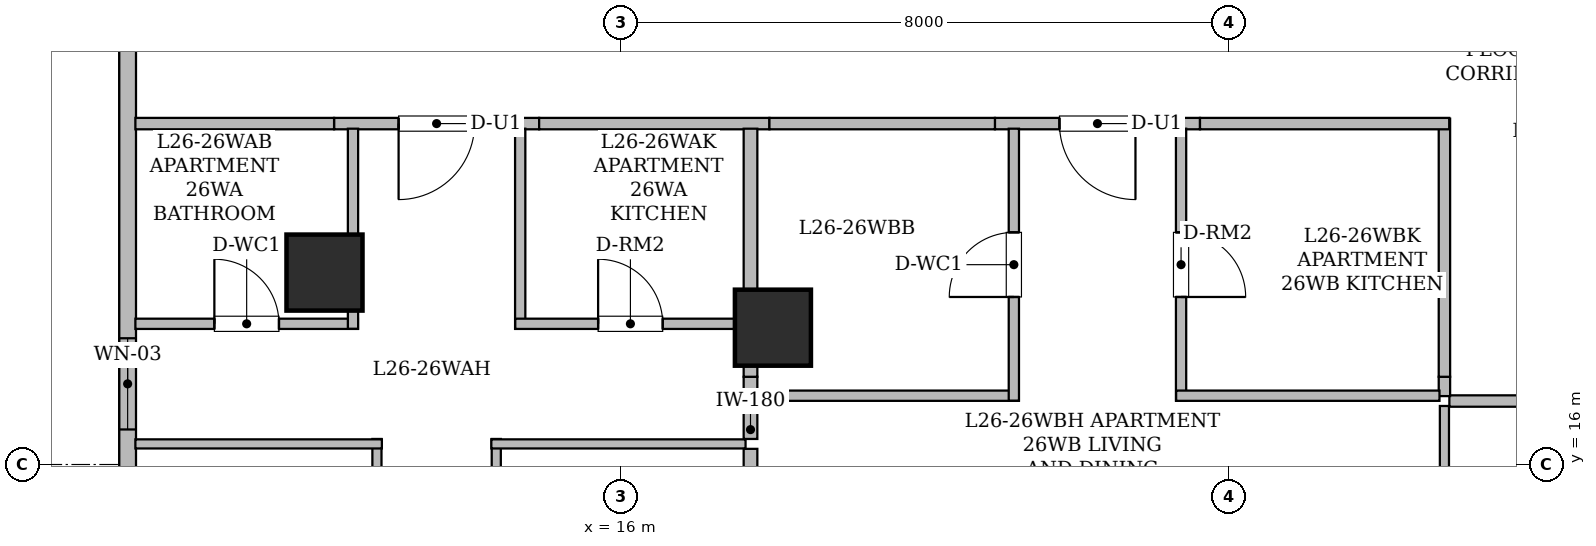
"""IFC4 building model, lengths in metres.
Left out: names, types, materials, properties, quantities, classifications, styles, units other than length and angle.
Written with IfcOpenShell. Run it as: python <this file> out.ifc"""

import sys

from ifc_helpers import new_model, si_unit, direction, frame, frame_2d, origin, origin_2d, place, context, subcontext, project, spatial, rectangle, hollow_rectangle, extrude, element, fill, save


model = new_model("IFC4")
c1 = context("Model", 3, precision=1e-05, world=origin(), true_north=direction((0.0, 1.0)))
c2 = subcontext(c1, "Body", "Model", "MODEL_VIEW")
j1 = project(units=[si_unit("LENGTHUNIT", "METRE"), si_unit("PLANEANGLEUNIT", "RADIAN")], contexts=[c1])
p1 = place(None, origin())
s1 = spatial("IfcSite", under=j1, at=p1, CompositionType="ELEMENT")
p2 = place(p1, origin())
s2 = spatial("IfcBuilding", under=s1, at=p2, CompositionType="ELEMENT")
p3 = place(p2, frame((0.0, 0.0, 105.55)))
s3 = spatial("IfcBuildingStorey", under=s2, at=p3, CompositionType="ELEMENT", Elevation=105.55)
for number, where, z_axis, x_axis in (
    (1, (12.1, 18.525, 0.0), (0.0, 0.0, 1.0), (1.0, 0.0, 0.0)),
    (2, (18.0, 17.8, 0.0), (0.0, 0.0, 1.0), (1.0, 0.0, 0.0)),
):
    element("IfcColumn", number, at=place(p3, frame(where, z_axis=z_axis, x_axis=x_axis)), inside=s3, PredefinedType="COLUMN", context=c2, shape_type="SweptSolid", body=[
        extrude(hollow_rectangle(XDim=1.0, YDim=1.0, WallThickness=0.05, at=origin_2d()), origin(), (0.0, 0.0, 1.0), 3.65),
    ])
p4 = place(p3, frame((9.51, 10.717, 0.0), z_axis=(0.0, 0.0, 1.0), x_axis=(0.0, 1.0, 0.0)))
e3 = element("IfcWall", 3, at=p4, inside=s3, PredefinedType="STANDARD", context=c2, shape_type="SweptSolid", body=[
    extrude(rectangle(XDim=14.046, YDim=0.22, at=frame_2d((7.023, 0.0))), origin(), (0.0, 0.0, 1.0), 3.43),
])
p5 = place(p4, frame((5.744, 0.0, 0.8)))
e4 = element("IfcOpeningElement", 4, at=p5, cuts=e3, PredefinedType="OPENING", context=c2, shape_type="SweptSolid", body=[
    extrude(rectangle(XDim=1.2, YDim=1.5, at=frame_2d((0.6, 0.75))), frame((0.0, 0.12, 0.0), z_axis=(0.0, -1.0, 0.0), x_axis=(1.0, 0.0, 0.0)), (0.0, 0.0, 1.0), 0.24),
])
p6 = place(p4, frame((2.345, 0.0, 0.85)))
e5 = element("IfcOpeningElement", 5, at=p6, cuts=e3, PredefinedType="OPENING", context=c2, shape_type="SweptSolid", body=[
    extrude(rectangle(XDim=1.65, YDim=1.55, at=frame_2d((0.825, 0.775))), frame((0.0, 0.12, 0.0), z_axis=(0.0, -1.0, 0.0), x_axis=(1.0, 0.0, 0.0)), (0.0, 0.0, 1.0), 0.24),
])
p7 = place(p3, frame((34.114, 16.835, 0.0), z_axis=(0.0, 0.0, 1.0), x_axis=(-1.0, 0.0, 0.0)))
e6 = element("IfcWall", 6, at=p7, inside=s3, PredefinedType="STANDARD", context=c2, shape_type="SweptSolid", body=[
    extrude(rectangle(XDim=7.214, YDim=0.15, at=frame_2d((3.607, 0.0))), origin(), (0.0, 0.0, 1.0), 2.647),
])
p8 = place(p7, frame((3.053, 0.0, 0.0)))
e7 = element("IfcOpeningElement", 7, at=p8, cuts=e6, PredefinedType="OPENING", context=c2, shape_type="SweptSolid", body=[
    extrude(rectangle(XDim=1.15, YDim=2.2, at=frame_2d((0.575, 1.1))), frame((0.0, 0.085, 0.0), z_axis=(0.0, -1.0, 0.0), x_axis=(1.0, 0.0, 0.0)), (0.0, 0.0, 1.0), 0.17),
])
p9 = place(p3, frame((14.924, 20.485, 0.0), z_axis=(0.0, 0.0, 1.0), x_axis=(-1.0, 0.0, 0.0)))
e8 = element("IfcWall", 8, at=p9, inside=s3, PredefinedType="STANDARD", context=c2, shape_type="SweptSolid", body=[
    extrude(rectangle(XDim=2.698, YDim=0.15, at=frame_2d((1.349, 0.0))), origin(), (0.0, 0.0, 1.0), 3.43),
])
p10 = place(p9, frame((0.849, 0.0, 0.0)))
e9 = element("IfcOpeningElement", 9, at=p10, cuts=e8, PredefinedType="OPENING", context=c2, shape_type="SweptSolid", body=[
    extrude(rectangle(XDim=1.0, YDim=2.15, at=frame_2d((0.5, 1.075))), frame((0.0, 0.085, 0.0), z_axis=(0.0, -1.0, 0.0), x_axis=(1.0, 0.0, 0.0)), (0.0, 0.0, 1.0), 0.17),
])
p11 = place(p3, frame((12.226, 20.485, 0.0), z_axis=(0.0, 0.0, 1.0), x_axis=(-1.0, 0.0, 0.0)))
e10 = element("IfcWall", 10, at=p11, inside=s3, PredefinedType="STANDARD", context=c2, shape_type="SweptSolid", body=[
    extrude(rectangle(XDim=2.614, YDim=0.15, at=frame_2d((1.307, 0.0))), origin(), (0.0, 0.0, 1.0), 2.876),
])
p12 = place(p3, frame((17.954, 20.485, 0.0), z_axis=(0.0, 0.0, 1.0), x_axis=(-1.0, 0.0, 0.0)))
e11 = element("IfcWall", 11, at=p12, inside=s3, PredefinedType="STANDARD", context=c2, shape_type="SweptSolid", body=[
    extrude(rectangle(XDim=3.03, YDim=0.15, at=frame_2d((1.515, 0.0))), origin(), (0.0, 0.0, 1.0), 2.647),
])
p13 = place(p3, frame((26.835, 16.9, 0.0), z_axis=(0.0, 0.0, 1.0), x_axis=(0.0, 1.0, 0.0)))
e12 = element("IfcWall", 12, at=p13, inside=s3, PredefinedType="STANDARD", context=c2, shape_type="SweptSolid", body=[
    extrude(rectangle(XDim=0.254, YDim=0.15, at=frame_2d((0.127, 0.0))), origin(), (0.0, 0.0, 1.0), 3.43),
])
p14 = place(p3, frame((23.619, 20.485, 0.0), z_axis=(0.0, 0.0, 1.0), x_axis=(-1.0, 0.0, 0.0)))
e13 = element("IfcWall", 13, at=p14, inside=s3, PredefinedType="STANDARD", context=c2, shape_type="SweptSolid", body=[
    extrude(rectangle(XDim=2.698, YDim=0.15, at=frame_2d((1.349, 0.0))), origin(), (0.0, 0.0, 1.0), 3.43),
])
p15 = place(p14, frame((0.849, 0.0, 0.0)))
e14 = element("IfcOpeningElement", 14, at=p15, cuts=e13, PredefinedType="OPENING", context=c2, shape_type="SweptSolid", body=[
    extrude(rectangle(XDim=1.0, YDim=2.15, at=frame_2d((0.5, 1.075))), frame((0.0, 0.085, 0.0), z_axis=(0.0, -1.0, 0.0), x_axis=(1.0, 0.0, 0.0)), (0.0, 0.0, 1.0), 0.17),
])
p16 = place(p3, frame((20.921, 20.485, 0.0), z_axis=(0.0, 0.0, 1.0), x_axis=(-1.0, 0.0, 0.0)))
e15 = element("IfcWall", 15, at=p16, inside=s3, PredefinedType="STANDARD", context=c2, shape_type="SweptSolid", body=[
    extrude(rectangle(XDim=2.967, YDim=0.15, at=frame_2d((1.483, 0.0))), origin(), (0.0, 0.0, 1.0), 2.647),
])
p17 = place(p3, frame((26.835, 17.154, 0.0), z_axis=(0.0, 0.0, 1.0), x_axis=(0.0, 1.0, 0.0)))
e16 = element("IfcWall", 16, at=p17, inside=s3, PredefinedType="STANDARD", context=c2, shape_type="SweptSolid", body=[
    extrude(rectangle(XDim=3.396, YDim=0.15, at=frame_2d((1.698, 0.0))), origin(), (0.0, 0.0, 1.0), 2.647),
])
p18 = place(p3, frame((26.898, 20.485, 0.0), z_axis=(0.0, 0.0, 1.0), x_axis=(-1.0, 0.0, 0.0)))
e17 = element("IfcWall", 17, at=p18, inside=s3, PredefinedType="STANDARD", context=c2, shape_type="SweptSolid", body=[
    extrude(rectangle(XDim=3.279, YDim=0.15, at=frame_2d((1.64, 0.0))), origin(), (0.0, 0.0, 1.0), 3.43),
])
p19 = place(p3, frame((26.835, 15.076, 0.0), z_axis=(0.0, 0.0, 1.0), x_axis=(0.0, 1.0, 0.0)))
e18 = element("IfcWall", 18, at=p19, inside=s3, PredefinedType="PARTITIONING", context=c2, shape_type="SweptSolid", body=[
    extrude(rectangle(XDim=1.694, YDim=0.12, at=frame_2d((0.847, 0.0))), origin(), (0.0, 0.0, 1.0), 3.43),
])
p20 = place(p3, frame((9.612, 17.851, 0.0), z_axis=(0.0, 0.0, 1.0), x_axis=(1.0, 0.0, 0.0)))
e19 = element("IfcWall", 19, at=p20, inside=s3, PredefinedType="PARTITIONING", context=c2, shape_type="SweptSolid", body=[
    extrude(rectangle(XDim=2.928, YDim=0.135, at=frame_2d((1.464, 0.0))), origin(), (0.0, 0.0, 1.0), 2.876),
])
p21 = place(p20, frame((1.039, 0.0, 0.0)))
e20 = element("IfcOpeningElement", 20, at=p21, cuts=e19, PredefinedType="OPENING", context=c2, shape_type="SweptSolid", body=[
    extrude(rectangle(XDim=0.85, YDim=2.1, at=frame_2d((0.425, 1.05))), frame((0.0, 0.077, 0.0), z_axis=(0.0, -1.0, 0.0), x_axis=(1.0, 0.0, 0.0)), (0.0, 0.0, 1.0), 0.155),
])
for number, where, z_axis, x_axis in (
    (21, (12.475, 17.786, 0.0), (0.0, 0.0, 1.0), (0.0, 1.0, 0.0)),
    (22, (14.675, 20.418, 0.0), (0.0, 0.0, 1.0), (0.0, -1.0, 0.0)),
):
    element("IfcWall", number, at=place(p3, frame(where, z_axis=z_axis, x_axis=x_axis)), inside=s3, PredefinedType="PARTITIONING", context=c2, shape_type="SweptSolid", body=[
        extrude(rectangle(XDim=2.632, YDim=0.135, at=frame_2d((1.316, 0.0))), origin(), (0.0, 0.0, 1.0), 2.647),
    ])
p22 = place(p3, frame((14.61, 17.851, 0.0), z_axis=(0.0, 0.0, 1.0), x_axis=(1.0, 0.0, 0.0)))
e23 = element("IfcWall", 23, at=p22, inside=s3, PredefinedType="PARTITIONING", context=c2, shape_type="SweptSolid", body=[
    extrude(rectangle(XDim=3.03, YDim=0.135, at=frame_2d((1.515, 0.0))), origin(), (0.0, 0.0, 1.0), 2.647),
])
p23 = place(p22, frame((1.09, 0.0, 0.0)))
e24 = element("IfcOpeningElement", 24, at=p23, cuts=e23, PredefinedType="OPENING", context=c2, shape_type="SweptSolid", body=[
    extrude(rectangle(XDim=0.85, YDim=2.1, at=frame_2d((0.425, 1.05))), frame((0.0, 0.077, 0.0), z_axis=(0.0, -1.0, 0.0), x_axis=(1.0, 0.0, 0.0)), (0.0, 0.0, 1.0), 0.155),
])
p24 = place(p3, frame((12.79, 7.357, 0.0), z_axis=(0.0, 0.0, 1.0), x_axis=(0.0, 1.0, 0.0)))
e25 = element("IfcWall", 25, at=p24, inside=s3, PredefinedType="PARTITIONING", context=c2, shape_type="SweptSolid", body=[
    extrude(rectangle(XDim=8.979, YDim=0.12, at=frame_2d((4.49, 0.0))), origin(), (0.0, 0.0, 1.0), 2.876),
])
p25 = place(p24, frame((4.039, 0.0, 0.0)))
e26 = element("IfcOpeningElement", 26, at=p25, cuts=e25, PredefinedType="OPENING", context=c2, shape_type="SweptSolid", body=[
    extrude(rectangle(XDim=0.9, YDim=2.1, at=frame_2d((0.45, 1.05))), frame((0.0, 0.07, 0.0), z_axis=(0.0, -1.0, 0.0), x_axis=(1.0, 0.0, 0.0)), (0.0, 0.0, 1.0), 0.14),
])
p26 = place(p3, frame((12.855, 16.271, 0.0), z_axis=(0.0, 0.0, 1.0), x_axis=(-1.0, 0.0, 0.0)))
e27 = element("IfcWall", 27, at=p26, inside=s3, PredefinedType="PARTITIONING", context=c2, shape_type="SweptSolid", body=[
    extrude(rectangle(XDim=3.243, YDim=0.12, at=frame_2d((1.622, 0.0))), origin(), (0.0, 0.0, 1.0), 3.43),
])
p27 = place(p3, frame((14.36, 16.336, 0.0), z_axis=(0.0, 0.0, 1.0), x_axis=(0.0, -1.0, 0.0)))
e28 = element("IfcWall", 28, at=p27, inside=s3, PredefinedType="PARTITIONING", context=c2, shape_type="SweptSolid", body=[
    extrude(rectangle(XDim=9.724, YDim=0.12, at=frame_2d((4.862, 0.0))), origin(), (0.0, 0.0, 1.0), 2.876),
])
p28 = place(p27, frame((4.412, 0.0, 0.0)))
e29 = element("IfcOpeningElement", 29, at=p28, cuts=e28, PredefinedType="OPENING", context=c2, shape_type="SweptSolid", body=[
    extrude(rectangle(XDim=0.9, YDim=2.1, at=frame_2d((0.45, 1.05))), frame((0.0, 0.07, 0.0), z_axis=(0.0, -1.0, 0.0), x_axis=(1.0, 0.0, 0.0)), (0.0, 0.0, 1.0), 0.14),
])
p29 = place(p3, frame((17.64, 16.271, 0.0), z_axis=(0.0, 0.0, 1.0), x_axis=(-1.0, 0.0, 0.0)))
e30 = element("IfcWall", 30, at=p29, inside=s3, PredefinedType="PARTITIONING", context=c2, shape_type="SweptSolid", body=[
    extrude(rectangle(XDim=3.345, YDim=0.12, at=frame_2d((1.672, 0.0))), origin(), (0.0, 0.0, 1.0), 2.647),
])
p30 = place(p3, frame((17.705, 17.154, 0.0), z_axis=(0.0, 0.0, 1.0), x_axis=(0.0, -1.0, 0.0)))
e31 = element("IfcWall", 31, at=p30, inside=s3, PredefinedType="STANDARD", context=c2, shape_type="SweptSolid", body=[
    extrude(rectangle(XDim=0.818, YDim=0.18, at=frame_2d((0.409, 0.0))), origin(), (0.0, 0.0, 1.0), 2.647),
])
p31 = place(p3, frame((17.705, 17.786, 0.0), z_axis=(0.0, 0.0, 1.0), x_axis=(0.0, -1.0, 0.0)))
e32 = element("IfcWall", 32, at=p31, inside=s3, PredefinedType="STANDARD", context=c2, shape_type="SweptSolid", body=[
    extrude(rectangle(XDim=0.632, YDim=0.18, at=frame_2d((0.316, 0.0))), origin(), (0.0, 0.0, 1.0), 2.647),
])
p32 = place(p3, frame((17.705, 20.418, 0.0), z_axis=(0.0, 0.0, 1.0), x_axis=(0.0, -1.0, 0.0)))
e33 = element("IfcWall", 33, at=p32, inside=s3, PredefinedType="STANDARD", context=c2, shape_type="SweptSolid", body=[
    extrude(rectangle(XDim=2.502, YDim=0.18, at=frame_2d((1.251, 0.0))), origin(), (0.0, 0.0, 1.0), 2.647),
])
p33 = place(p3, frame((17.705, 16.206, 0.0), z_axis=(0.0, 0.0, 1.0), x_axis=(0.0, -1.0, 0.0)))
e34 = element("IfcWall", 34, at=p33, inside=s3, PredefinedType="STANDARD", context=c2, shape_type="SweptSolid", body=[
    extrude(rectangle(XDim=1.13, YDim=0.18, at=frame_2d((0.565, 0.0))), origin(), (0.0, 0.0, 1.0), 2.647),
])
p34 = place(p3, frame((17.787, 16.905, 0.0), z_axis=(0.0, 0.0, 1.0), x_axis=(1.0, 0.0, 0.0)))
e35 = element("IfcWall", 35, at=p34, inside=s3, PredefinedType="PARTITIONING", context=c2, shape_type="SweptSolid", body=[
    extrude(rectangle(XDim=3.448, YDim=0.135, at=frame_2d((1.724, 0.0))), origin(), (0.0, 0.0, 1.0), 2.647),
])
p35 = place(p3, frame((21.17, 16.84, 0.0), z_axis=(0.0, 0.0, 1.0), x_axis=(0.0, 1.0, 0.0)))
e36 = element("IfcWall", 36, at=p35, inside=s3, PredefinedType="PARTITIONING", context=c2, shape_type="SweptSolid", body=[
    extrude(rectangle(XDim=3.578, YDim=0.135, at=frame_2d((1.789, 0.0))), origin(), (0.0, 0.0, 1.0), 2.647),
])
p36 = place(p35, frame((1.364, 0.0, 0.0)))
e37 = element("IfcOpeningElement", 37, at=p36, cuts=e36, PredefinedType="OPENING", context=c2, shape_type="SweptSolid", body=[
    extrude(rectangle(XDim=0.85, YDim=2.1, at=frame_2d((0.425, 1.05))), frame((0.0, 0.077, 0.0), z_axis=(0.0, -1.0, 0.0), x_axis=(1.0, 0.0, 0.0)), (0.0, 0.0, 1.0), 0.155),
])
p37 = place(p3, frame((23.37, 20.418, 0.0), z_axis=(0.0, 0.0, 1.0), x_axis=(0.0, -1.0, 0.0)))
e38 = element("IfcWall", 38, at=p37, inside=s3, PredefinedType="PARTITIONING", context=c2, shape_type="SweptSolid", body=[
    extrude(rectangle(XDim=3.578, YDim=0.135, at=frame_2d((1.789, 0.0))), origin(), (0.0, 0.0, 1.0), 2.647),
])
p38 = place(p37, frame((1.364, 0.0, 0.0)))
e39 = element("IfcOpeningElement", 39, at=p38, cuts=e38, PredefinedType="OPENING", context=c2, shape_type="SweptSolid", body=[
    extrude(rectangle(XDim=0.85, YDim=2.1, at=frame_2d((0.425, 1.05))), frame((0.0, 0.077, 0.0), z_axis=(0.0, -1.0, 0.0), x_axis=(1.0, 0.0, 0.0)), (0.0, 0.0, 1.0), 0.155),
])
p39 = place(p3, frame((23.305, 16.905, 0.0), z_axis=(0.0, 0.0, 1.0), x_axis=(1.0, 0.0, 0.0)))
e40 = element("IfcWall", 40, at=p39, inside=s3, PredefinedType="PARTITIONING", context=c2, shape_type="SweptSolid", body=[
    extrude(rectangle(XDim=3.465, YDim=0.135, at=frame_2d((1.732, 0.0))), origin(), (0.0, 0.0, 1.0), 3.43),
])
p40 = place(p5, origin())
e41 = element("IfcWindow", 41, at=p40, inside=s3, PartitioningType="SINGLE_PANEL", PredefinedType="WINDOW", context=c2, shape_type="SweptSolid", body=[
    extrude(rectangle(XDim=1.2, YDim=1.5, at=frame_2d((0.6, 0.75))), frame((0.0, 0.03, 0.0), z_axis=(0.0, -1.0, 0.0), x_axis=(1.0, 0.0, 0.0)), (0.0, 0.0, 1.0), 0.06),
])
fill(e4, e41)
p41 = place(p10, origin())
e42 = element("IfcDoor", 42, at=p41, inside=s3, OperationType="SINGLE_SWING_RIGHT", PredefinedType="DOOR", context=c2, shape_type="SweptSolid", body=[
    extrude(rectangle(XDim=1.0, YDim=2.15, at=frame_2d((0.5, 1.075))), frame((0.0, 0.025, 0.0), z_axis=(0.0, -1.0, 0.0), x_axis=(1.0, 0.0, 0.0)), (0.0, 0.0, 1.0), 0.05),
])
fill(e9, e42)
p42 = place(p15, origin())
e43 = element("IfcDoor", 43, at=p42, inside=s3, OperationType="SINGLE_SWING_LEFT", PredefinedType="DOOR", context=c2, shape_type="SweptSolid", body=[
    extrude(rectangle(XDim=1.0, YDim=2.15, at=frame_2d((0.5, 1.075))), frame((0.0, 0.025, 0.0), z_axis=(0.0, -1.0, 0.0), x_axis=(1.0, 0.0, 0.0)), (0.0, 0.0, 1.0), 0.05),
])
fill(e14, e43)
p43 = place(p21, origin())
e44 = element("IfcDoor", 44, at=p43, inside=s3, OperationType="SINGLE_SWING_LEFT", PredefinedType="DOOR", context=c2, shape_type="SweptSolid", body=[
    extrude(rectangle(XDim=0.85, YDim=2.1, at=frame_2d((0.425, 1.05))), frame((0.0, 0.025, 0.0), z_axis=(0.0, -1.0, 0.0), x_axis=(1.0, 0.0, 0.0)), (0.0, 0.0, 1.0), 0.05),
])
fill(e20, e44)
p44 = place(p23, origin())
e45 = element("IfcDoor", 45, at=p44, inside=s3, OperationType="SINGLE_SWING_LEFT", PredefinedType="DOOR", context=c2, shape_type="SweptSolid", body=[
    extrude(rectangle(XDim=0.85, YDim=2.1, at=frame_2d((0.425, 1.05))), frame((0.0, 0.025, 0.0), z_axis=(0.0, -1.0, 0.0), x_axis=(1.0, 0.0, 0.0)), (0.0, 0.0, 1.0), 0.05),
])
fill(e24, e45)
p45 = place(p36, origin())
e46 = element("IfcDoor", 46, at=p45, inside=s3, OperationType="SINGLE_SWING_LEFT", PredefinedType="DOOR", context=c2, shape_type="SweptSolid", body=[
    extrude(rectangle(XDim=0.85, YDim=2.1, at=frame_2d((0.425, 1.05))), frame((0.0, 0.025, 0.0), z_axis=(0.0, -1.0, 0.0), x_axis=(1.0, 0.0, 0.0)), (0.0, 0.0, 1.0), 0.05),
])
fill(e37, e46)
p46 = place(p38, origin())
e47 = element("IfcDoor", 47, at=p46, inside=s3, OperationType="SINGLE_SWING_RIGHT", PredefinedType="DOOR", context=c2, shape_type="SweptSolid", body=[
    extrude(rectangle(XDim=0.85, YDim=2.1, at=frame_2d((0.425, 1.05))), frame((0.0, 0.025, 0.0), z_axis=(0.0, -1.0, 0.0), x_axis=(1.0, 0.0, 0.0)), (0.0, 0.0, 1.0), 0.05),
])
fill(e39, e47)
save(model, sys.argv[1])
